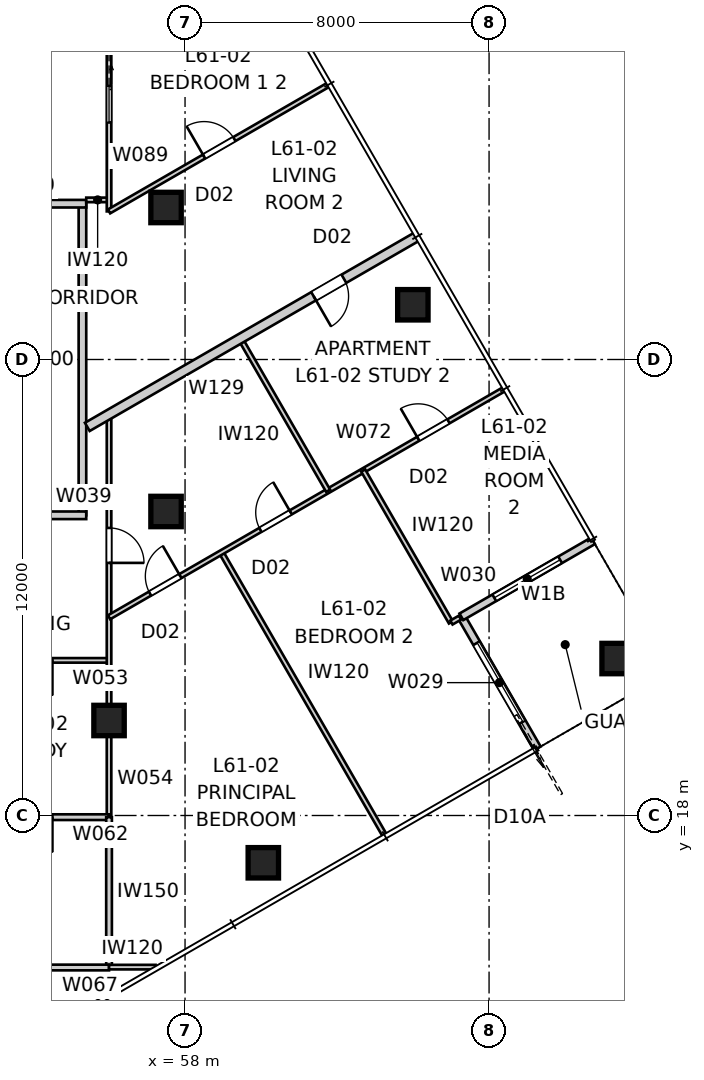
"""IFC4 building model, lengths in metres.
Left out: names, types, materials, properties, quantities, classifications, styles, units other than length and angle.
Written with IfcOpenShell. Run it as: python <this file> out.ifc"""

import sys

from ifc_helpers import new_model, si_unit, direction, frame, frame_2d, origin, origin_2d, place, context, subcontext, project, spatial, rectangle, extrude, element, fill, save


model = new_model("IFC4")
c1 = context("Model", 3, precision=1e-05, world=origin(), true_north=direction((0.0, 1.0)))
c2 = subcontext(c1, "Body", "Model", "MODEL_VIEW")
j1 = project(units=[si_unit("LENGTHUNIT", "METRE"), si_unit("PLANEANGLEUNIT", "RADIAN")], contexts=[c1])
p1 = place(None, origin())
s1 = spatial("IfcSite", under=j1, at=p1, CompositionType="ELEMENT")
p2 = place(p1, origin())
s2 = spatial("IfcBuilding", under=s1, at=p2, CompositionType="ELEMENT")
p3 = place(p2, frame((0.0, 0.0, 221.8)))
s3 = spatial("IfcBuildingStorey", under=s2, at=p3, CompositionType="ELEMENT", Elevation=221.8)
for number, where, z_axis, x_axis in (
    (1, (60.06, 16.755, 0.0), (0.0, 0.0, 1.0), (1.0, 0.0, 0.0)),
    (2, (69.37, 22.13, 0.0), (0.0, 0.0, 1.0), (1.0, 0.0, 0.0)),
    (3, (63.995, 31.44, 0.0), (0.0, 0.0, 1.0), (1.0, 0.0, 0.0)),
    (4, (57.5, 26.0, 0.0), (0.0, 0.0, 1.0), (1.0, 0.0, 0.0)),
    (5, (57.5, 34.0, 0.0), (0.0, 0.0, 1.0), (1.0, 0.0, 0.0)),
    (6, (56.0, 20.5, 0.0), (0.0, 0.0, 1.0), (1.0, 0.0, 0.0)),
):
    element("IfcColumn", number, at=place(p3, frame(where, z_axis=z_axis, x_axis=x_axis)), inside=s3, PredefinedType="COLUMN", context=c2, shape_type="SweptSolid", body=[
        extrude(rectangle(XDim=0.8, YDim=0.8, at=origin_2d()), origin(), (0.0, 0.0, 1.0), 3.4),
    ])
p4 = place(p3, frame((67.271, 19.764, 0.0), z_axis=(0.0, 0.0, 1.0), x_axis=(-0.49999894854, 0.866026010844, 0.0)))
e7 = element("IfcWall", 7, at=p4, inside=s3, PredefinedType="SOLIDWALL", context=c2, shape_type="SweptSolid", body=[
    extrude(rectangle(XDim=4.0, YDim=0.2, at=frame_2d((2.0, 0.0))), origin(), (0.0, 0.0, 1.0), 3.25),
])
p5 = place(p4, frame((0.8, 0.0, 0.0)))
e8 = element("IfcOpeningElement", 8, at=p5, cuts=e7, PredefinedType="OPENING", context=c2, shape_type="SweptSolid", body=[
    extrude(rectangle(XDim=2.4, YDim=2.1, at=frame_2d((1.2, 1.05))), frame((0.0, 0.11, 0.0), z_axis=(0.0, -1.0, 0.0), x_axis=(1.0, 0.0, 0.0)), (0.0, 0.0, 1.0), 0.22),
])
p6 = place(p3, frame((65.271, 23.229, 0.0), z_axis=(0.0, 0.0, 1.0), x_axis=(0.866026010844, 0.49999894854, 0.0)))
e9 = element("IfcWall", 9, at=p6, inside=s3, PredefinedType="SOLIDWALL", context=c2, shape_type="SweptSolid", body=[
    extrude(rectangle(XDim=4.0, YDim=0.2, at=frame_2d((2.0, 0.0))), origin(), (0.0, 0.0, 1.0), 3.25),
])
p7 = place(p6, frame((1.0, 0.0, 0.45)))
e10 = element("IfcOpeningElement", 10, at=p7, cuts=e9, PredefinedType="OPENING", context=c2, shape_type="SweptSolid", body=[
    extrude(rectangle(XDim=2.0, YDim=1.8, at=frame_2d((1.0, 0.9))), frame((0.0, 0.11, 0.0), z_axis=(0.0, -1.0, 0.0), x_axis=(1.0, 0.0, 0.0)), (0.0, 0.0, 1.0), 0.22),
])
p8 = place(p3, frame((55.3, 25.9, 0.0), z_axis=(0.0, 0.0, 1.0), x_axis=(0.0, 1.0, 0.0)))
e11 = element("IfcWall", 11, at=p8, inside=s3, PredefinedType="PARTITIONING", context=c2, shape_type="SweptSolid", body=[
    extrude(rectangle(XDim=8.2, YDim=0.2, at=frame_2d((4.1, 0.0))), origin(), (0.0, 0.0, 1.0), 3.25),
])
p9 = place(p3, frame((52.1, 34.1, 0.0), z_axis=(0.0, 0.0, 1.0), x_axis=(1.0, 0.0, 0.0)))
e12 = element("IfcWall", 12, at=p9, inside=s3, PredefinedType="PARTITIONING", context=c2, shape_type="SweptSolid", body=[
    extrude(rectangle(XDim=3.3, YDim=0.2, at=frame_2d((1.65, 0.0))), origin(), (0.0, 0.0, 1.0), 3.25),
])
p10 = place(p3, frame((52.1, 25.9, 0.0), z_axis=(0.0, 0.0, 1.0), x_axis=(1.0, 0.0, 0.0)))
e13 = element("IfcWall", 13, at=p10, inside=s3, PredefinedType="PARTITIONING", context=c2, shape_type="SweptSolid", body=[
    extrude(rectangle(XDim=3.3, YDim=0.2, at=frame_2d((1.65, 0.0))), origin(), (0.0, 0.0, 1.0), 3.25),
])
p11 = place(p10, frame((1.04, 0.0, 0.0)))
e14 = element("IfcOpeningElement", 14, at=p11, cuts=e13, PredefinedType="OPENING", context=c2, shape_type="SweptSolid", body=[
    extrude(rectangle(XDim=1.02, YDim=2.34, at=frame_2d((0.51, 1.17))), frame((0.0, 0.11, 0.0), z_axis=(0.0, -1.0, 0.0), x_axis=(1.0, 0.0, 0.0)), (0.0, 0.0, 1.0), 0.22),
])
p12 = place(p3, frame((59.486, 41.25, 0.0), z_axis=(0.0, 0.0, 1.0), x_axis=(-0.866020489494, -0.500008511703, 0.0)))
e15 = element("IfcWall", 15, at=p12, inside=s3, PredefinedType="PARTITIONING", context=c2, shape_type="SweptSolid", body=[
    extrude(rectangle(XDim=8.496, YDim=0.25, at=frame_2d((4.248, 0.0))), origin(), (0.0, 0.0, 1.0), 3.25),
])
p13 = place(p3, frame((64.111, 33.239, 0.0), z_axis=(0.0, 0.0, 1.0), x_axis=(-0.866024190901, -0.50000210077, 0.0)))
e16 = element("IfcWall", 16, at=p13, inside=s3, PredefinedType="PARTITIONING", context=c2, shape_type="SweptSolid", body=[
    extrude(rectangle(XDim=10.026, YDim=0.25, at=frame_2d((5.013, 0.0))), origin(), (0.0, 0.0, 1.0), 3.25),
])
p14 = place(p13, frame((2.229, 0.0, 0.0)))
e17 = element("IfcOpeningElement", 17, at=p14, cuts=e16, PredefinedType="OPENING", context=c2, shape_type="SweptSolid", body=[
    extrude(rectangle(XDim=0.92, YDim=2.34, at=frame_2d((0.46, 1.17))), frame((0.0, 0.135, 0.0), z_axis=(0.0, -1.0, 0.0), x_axis=(1.0, 0.0, 0.0)), (0.0, 0.0, 1.0), 0.27),
])
p15 = place(p3, frame((56.0, 22.083, 0.0), z_axis=(0.0, 0.0, 1.0), x_axis=(-1.0, 0.0, 0.0)))
e18 = element("IfcWall", 18, at=p15, inside=s3, PredefinedType="PARTITIONING", context=c2, shape_type="SweptSolid", body=[
    extrude(rectangle(XDim=3.9, YDim=0.12, at=frame_2d((1.95, 0.0))), origin(), (0.0, 0.0, 1.0), 3.25),
])
p16 = place(p15, frame((1.49, 0.0, 0.0)))
e19 = element("IfcOpeningElement", 19, at=p16, cuts=e18, PredefinedType="OPENING", context=c2, shape_type="SweptSolid", body=[
    extrude(rectangle(XDim=0.92, YDim=2.34, at=frame_2d((0.46, 1.17))), frame((0.0, 0.07, 0.0), z_axis=(0.0, -1.0, 0.0), x_axis=(1.0, 0.0, 0.0)), (0.0, 0.0, 1.0), 0.14),
])
p17 = place(p3, frame((56.0, 28.557, 0.0), z_axis=(0.0, 0.0, 1.0), x_axis=(0.0, -1.0, 0.0)))
e20 = element("IfcWall", 20, at=p17, inside=s3, PredefinedType="PARTITIONING", context=c2, shape_type="SweptSolid", body=[
    extrude(rectangle(XDim=10.601, YDim=0.12, at=frame_2d((5.3, 0.0))), origin(), (0.0, 0.0, 1.0), 2.55),
])
p18 = place(p17, frame((2.989, 0.0, 0.0)))
e21 = element("IfcOpeningElement", 21, at=p18, cuts=e20, PredefinedType="OPENING", context=c2, shape_type="SweptSolid", body=[
    extrude(rectangle(XDim=0.92, YDim=2.34, at=frame_2d((0.46, 1.17))), frame((0.0, 0.07, 0.0), z_axis=(0.0, -1.0, 0.0), x_axis=(1.0, 0.0, 0.0)), (0.0, 0.0, 1.0), 0.14),
])
p19 = place(p3, frame((56.0, 17.956, 0.0), z_axis=(0.0, 0.0, 1.0), x_axis=(-1.0, 0.0, 0.0)))
e22 = element("IfcWall", 22, at=p19, inside=s3, PredefinedType="SOLIDWALL", context=c2, shape_type="SweptSolid", body=[
    extrude(rectangle(XDim=3.9, YDim=0.15, at=frame_2d((1.95, 0.0))), origin(), (0.0, 0.0, 1.0), 3.25),
])
p20 = place(p19, frame((1.49, 0.0, 0.0)))
e23 = element("IfcOpeningElement", 23, at=p20, cuts=e22, PredefinedType="OPENING", context=c2, shape_type="SweptSolid", body=[
    extrude(rectangle(XDim=0.92, YDim=2.1, at=frame_2d((0.46, 1.05))), frame((0.0, 0.085, 0.0), z_axis=(0.0, -1.0, 0.0), x_axis=(1.0, 0.0, 0.0)), (0.0, 0.0, 1.0), 0.17),
])
p21 = place(p3, frame((56.0, 17.956, 0.0), z_axis=(0.0, 0.0, 1.0), x_axis=(0.0, -1.0, 0.0)))
e24 = element("IfcWall", 24, at=p21, inside=s3, PredefinedType="SOLIDWALL", context=c2, shape_type="SweptSolid", body=[
    extrude(rectangle(XDim=3.956, YDim=0.15, at=frame_2d((1.978, 0.0))), origin(), (0.0, 0.0, 1.0), 3.25),
])
p22 = place(p3, frame((56.0, 14.0, 0.0), z_axis=(0.0, 0.0, 1.0), x_axis=(-1.0, 0.0, 0.0)))
e25 = element("IfcWall", 25, at=p22, inside=s3, PredefinedType="SOLIDWALL", context=c2, shape_type="SweptSolid", body=[
    extrude(rectangle(XDim=4.243, YDim=0.15, at=frame_2d((2.122, 0.0))), origin(), (0.0, 0.0, 1.0), 3.25),
])
p23 = place(p22, frame((1.661, 0.0, 0.0)))
e26 = element("IfcOpeningElement", 26, at=p23, cuts=e25, PredefinedType="OPENING", context=c2, shape_type="SweptSolid", body=[
    extrude(rectangle(XDim=0.92, YDim=2.34, at=frame_2d((0.46, 1.17))), frame((0.0, 0.085, 0.0), z_axis=(0.0, -1.0, 0.0), x_axis=(1.0, 0.0, 0.0)), (0.0, 0.0, 1.0), 0.17),
])
p24 = place(p3, frame((58.954, 24.921, 0.0), z_axis=(0.0, 0.0, 1.0), x_axis=(0.49999898161, -0.866025991751, 0.0)))
e27 = element("IfcWall", 27, at=p24, inside=s3, PredefinedType="PARTITIONING", context=c2, shape_type="SweptSolid", body=[
    extrude(rectangle(XDim=8.585, YDim=0.12, at=frame_2d((4.292, 0.0))), origin(), (0.0, 0.0, 1.0), 3.25),
])
p25 = place(p3, frame((57.225, 14.01, 0.0), z_axis=(0.0, 0.0, 1.0), x_axis=(-1.0, 0.0, 0.0)))
e28 = element("IfcWall", 28, at=p25, inside=s3, PredefinedType="PARTITIONING", context=c2, shape_type="SweptSolid", body=[
    extrude(rectangle(XDim=1.225, YDim=0.12, at=frame_2d((0.612, 0.0))), origin(), (0.0, 0.0, 1.0), 3.25),
])
p26 = place(p3, frame((56.0, 23.216, 0.0), z_axis=(0.0, 0.0, 1.0), x_axis=(0.866023917076, 0.500002575046, 0.0)))
e29 = element("IfcWall", 29, at=p26, inside=s3, PredefinedType="PARTITIONING", context=c2, shape_type="SweptSolid", body=[
    extrude(rectangle(XDim=11.996, YDim=0.12, at=frame_2d((5.998, 0.0))), origin(), (0.0, 0.0, 1.0), 3.25),
])
p27 = place(p26, frame((1.245, 0.0, 0.0)))
e30 = element("IfcOpeningElement", 30, at=p27, cuts=e29, PredefinedType="OPENING", context=c2, shape_type="SweptSolid", body=[
    extrude(rectangle(XDim=0.92, YDim=2.34, at=frame_2d((0.46, 1.17))), frame((0.0, 0.07, 0.0), z_axis=(0.0, -1.0, 0.0), x_axis=(1.0, 0.0, 0.0)), (0.0, 0.0, 1.0), 0.14),
])
p28 = place(p26, frame((4.599, 0.0, 0.0)))
e31 = element("IfcOpeningElement", 31, at=p28, cuts=e29, PredefinedType="OPENING", context=c2, shape_type="SweptSolid", body=[
    extrude(rectangle(XDim=0.92, YDim=2.34, at=frame_2d((0.46, 1.17))), frame((0.0, 0.07, 0.0), z_axis=(0.0, -1.0, 0.0), x_axis=(1.0, 0.0, 0.0)), (0.0, 0.0, 1.0), 0.14),
])
p29 = place(p26, frame((9.394, 0.0, 0.0)))
e32 = element("IfcOpeningElement", 32, at=p29, cuts=e29, PredefinedType="OPENING", context=c2, shape_type="SweptSolid", body=[
    extrude(rectangle(XDim=0.92, YDim=2.34, at=frame_2d((0.46, 1.17))), frame((0.0, 0.07, 0.0), z_axis=(0.0, -1.0, 0.0), x_axis=(1.0, 0.0, 0.0)), (0.0, 0.0, 1.0), 0.14),
])
p30 = place(p3, frame((62.688, 27.078, 0.0), z_axis=(0.0, 0.0, 1.0), x_axis=(0.500007885066, -0.866020851292, 0.0)))
e33 = element("IfcWall", 33, at=p30, inside=s3, PredefinedType="PARTITIONING", context=c2, shape_type="SweptSolid", body=[
    extrude(rectangle(XDim=4.615, YDim=0.12, at=frame_2d((2.308, 0.0))), origin(), (0.0, 0.0, 1.0), 3.25),
])
p31 = place(p3, frame((65.01, 23.077, 0.0), z_axis=(0.0, 0.0, 1.0), x_axis=(0.865829262097, 0.500339573586, 0.0)))
e34 = element("IfcWall", 34, at=p31, inside=s3, PredefinedType="PARTITIONING", context=c2, shape_type="SweptSolid", body=[
    extrude(rectangle(XDim=0.262, YDim=0.12, at=frame_2d((0.131, 0.0))), origin(), (0.0, 0.0, 1.0), 3.25),
])
p32 = place(p3, frame((61.766, 26.545, 0.0), z_axis=(0.0, 0.0, 1.0), x_axis=(-0.499999662836, 0.866025598446, 0.0)))
e35 = element("IfcWall", 35, at=p32, inside=s3, PredefinedType="PARTITIONING", context=c2, shape_type="SweptSolid", body=[
    extrude(rectangle(XDim=4.625, YDim=0.12, at=frame_2d((2.312, 0.0))), origin(), (0.0, 0.0, 1.0), 3.25),
])
p33 = place(p3, frame((56.0, 34.2, 0.0), z_axis=(0.0, 0.0, 1.0), x_axis=(-1.0, 0.0, 0.0)))
e36 = element("IfcWall", 36, at=p33, inside=s3, PredefinedType="PARTITIONING", context=c2, shape_type="SweptSolid", body=[
    extrude(rectangle(XDim=0.6, YDim=0.12, at=frame_2d((0.3, 0.0))), origin(), (0.0, 0.0, 1.0), 3.25),
])
p34 = place(p3, frame((56.0, 44.578, 0.0), z_axis=(0.0, 0.0, 1.0), x_axis=(0.0, -1.0, 0.0)))
e37 = element("IfcWall", 37, at=p34, inside=s3, PredefinedType="PARTITIONING", context=c2, shape_type="SweptSolid", body=[
    extrude(rectangle(XDim=10.681, YDim=0.12, at=frame_2d((5.34, 0.0))), origin(), (0.0, 0.0, 1.0), 2.55),
])
p35 = place(p34, frame((0.77, 0.0, 0.0)))
e38 = element("IfcOpeningElement", 38, at=p35, cuts=e37, PredefinedType="OPENING", context=c2, shape_type="SweptSolid", body=[
    extrude(rectangle(XDim=0.96, YDim=2.1, at=frame_2d((0.48, 1.05))), frame((0.0, 0.07, 0.0), z_axis=(0.0, -1.0, 0.0), x_axis=(1.0, 0.0, 0.0)), (0.0, 0.0, 1.0), 0.14),
])
p36 = place(p34, frame((7.379, 0.0, 0.0)))
e39 = element("IfcOpeningElement", 39, at=p36, cuts=e37, PredefinedType="OPENING", context=c2, shape_type="SweptSolid", body=[
    extrude(rectangle(XDim=0.96, YDim=2.1, at=frame_2d((0.48, 1.05))), frame((0.0, 0.07, 0.0), z_axis=(0.0, -1.0, 0.0), x_axis=(1.0, 0.0, 0.0)), (0.0, 0.0, 1.0), 0.14),
])
p37 = place(p3, frame((56.0, 33.897, 0.0), z_axis=(0.0, 0.0, 1.0), x_axis=(0.866033470286, 0.49998602815, 0.0)))
e40 = element("IfcWall", 40, at=p37, inside=s3, PredefinedType="PARTITIONING", context=c2, shape_type="SweptSolid", body=[
    extrude(rectangle(XDim=6.655, YDim=0.12, at=frame_2d((3.328, 0.0))), origin(), (0.0, 0.0, 1.0), 3.25),
])
p38 = place(p37, frame((2.887, 0.0, 0.0)))
e41 = element("IfcOpeningElement", 41, at=p38, cuts=e40, PredefinedType="OPENING", context=c2, shape_type="SweptSolid", body=[
    extrude(rectangle(XDim=0.92, YDim=2.34, at=frame_2d((0.46, 1.17))), frame((0.0, 0.07, 0.0), z_axis=(0.0, -1.0, 0.0), x_axis=(1.0, 0.0, 0.0)), (0.0, 0.0, 1.0), 0.14),
])
p39 = place(p5, origin())
e42 = element("IfcDoor", 42, at=p39, inside=s3, OperationType="SLIDING_TO_LEFT", PredefinedType="DOOR", context=c2, shape_type="SweptSolid", body=[
    extrude(rectangle(XDim=2.4, YDim=2.1, at=frame_2d((1.2, 1.05))), frame((0.0, 0.025, 0.0), z_axis=(0.0, -1.0, 0.0), x_axis=(1.0, 0.0, 0.0)), (0.0, 0.0, 1.0), 0.05),
])
fill(e8, e42)
p40 = place(p7, origin())
e43 = element("IfcWindow", 43, at=p40, inside=s3, PartitioningType="SINGLE_PANEL", PredefinedType="WINDOW", context=c2, shape_type="SweptSolid", body=[
    extrude(rectangle(XDim=2.0, YDim=1.8, at=frame_2d((1.0, 0.9))), frame((0.0, 0.03, 0.0), z_axis=(0.0, -1.0, 0.0), x_axis=(1.0, 0.0, 0.0)), (0.0, 0.0, 1.0), 0.06),
])
fill(e10, e43)
p41 = place(p18, origin())
e44 = element("IfcDoor", 44, at=p41, inside=s3, OperationType="SINGLE_SWING_RIGHT", PredefinedType="DOOR", context=c2, shape_type="SweptSolid", body=[
    extrude(rectangle(XDim=0.92, YDim=2.34, at=frame_2d((0.46, 1.17))), frame((0.0, 0.025, 0.0), z_axis=(0.0, -1.0, 0.0), x_axis=(1.0, 0.0, 0.0)), (0.0, 0.0, 1.0), 0.05),
])
fill(e21, e44)
p42 = place(p38, origin())
e45 = element("IfcDoor", 45, at=p42, inside=s3, OperationType="SINGLE_SWING_LEFT", PredefinedType="DOOR", context=c2, shape_type="SweptSolid", body=[
    extrude(rectangle(XDim=0.92, YDim=2.34, at=frame_2d((0.46, 1.17))), frame((0.0, 0.025, 0.0), z_axis=(0.0, -1.0, 0.0), x_axis=(1.0, 0.0, 0.0)), (0.0, 0.0, 1.0), 0.05),
])
fill(e41, e45)
p43 = place(p14, origin())
e46 = element("IfcDoor", 46, at=p43, inside=s3, OperationType="SINGLE_SWING_RIGHT", PredefinedType="DOOR", context=c2, shape_type="SweptSolid", body=[
    extrude(rectangle(XDim=0.92, YDim=2.34, at=frame_2d((0.46, 1.17))), frame((0.0, 0.025, 0.0), z_axis=(0.0, -1.0, 0.0), x_axis=(1.0, 0.0, 0.0)), (0.0, 0.0, 1.0), 0.05),
])
fill(e17, e46)
p44 = place(p27, origin())
e47 = element("IfcDoor", 47, at=p44, inside=s3, OperationType="SINGLE_SWING_RIGHT", PredefinedType="DOOR", context=c2, shape_type="SweptSolid", body=[
    extrude(rectangle(XDim=0.92, YDim=2.34, at=frame_2d((0.46, 1.17))), frame((0.0, 0.025, 0.0), z_axis=(0.0, -1.0, 0.0), x_axis=(1.0, 0.0, 0.0)), (0.0, 0.0, 1.0), 0.05),
])
fill(e30, e47)
p45 = place(p28, origin())
e48 = element("IfcDoor", 48, at=p45, inside=s3, OperationType="SINGLE_SWING_RIGHT", PredefinedType="DOOR", context=c2, shape_type="SweptSolid", body=[
    extrude(rectangle(XDim=0.92, YDim=2.34, at=frame_2d((0.46, 1.17))), frame((0.0, 0.025, 0.0), z_axis=(0.0, -1.0, 0.0), x_axis=(1.0, 0.0, 0.0)), (0.0, 0.0, 1.0), 0.05),
])
fill(e31, e48)
p46 = place(p29, origin())
e49 = element("IfcDoor", 49, at=p46, inside=s3, OperationType="SINGLE_SWING_LEFT", PredefinedType="DOOR", context=c2, shape_type="SweptSolid", body=[
    extrude(rectangle(XDim=0.92, YDim=2.34, at=frame_2d((0.46, 1.17))), frame((0.0, 0.025, 0.0), z_axis=(0.0, -1.0, 0.0), x_axis=(1.0, 0.0, 0.0)), (0.0, 0.0, 1.0), 0.05),
])
fill(e32, e49)
p47 = place(p36, origin())
e50 = element("IfcDoor", 50, at=p47, inside=s3, OperationType="SLIDING_TO_LEFT", PredefinedType="DOOR", context=c2, shape_type="SweptSolid", body=[
    extrude(rectangle(XDim=0.96, YDim=2.1, at=frame_2d((0.48, 1.05))), frame((0.0, 0.025, 0.0), z_axis=(0.0, -1.0, 0.0), x_axis=(1.0, 0.0, 0.0)), (0.0, 0.0, 1.0), 0.05),
])
fill(e39, e50)
save(model, sys.argv[1])
